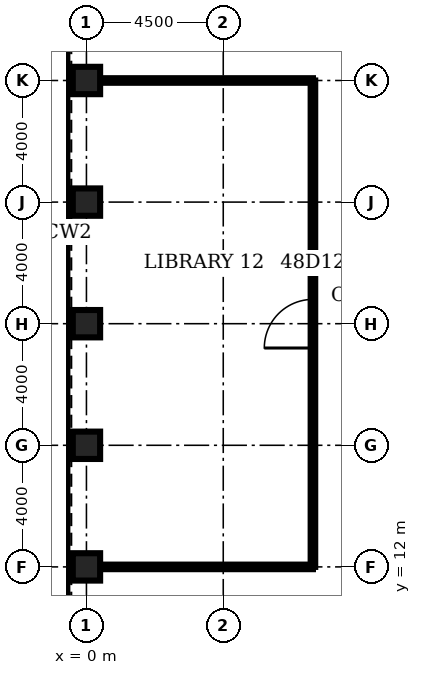
"""IFC4 building model, lengths in metres.
Left out: names, types, materials, properties, quantities, classifications, styles, units other than length and angle.
Written with IfcOpenShell. Run it as: python <this file> out.ifc"""

import sys

from ifc_helpers import new_model, si_unit, direction, frame, frame_2d, origin, origin_2d, place, context, subcontext, project, spatial, rectangle, hollow_rectangle, extrude, element, fill, save


model = new_model("IFC4")
c1 = context("Model", 3, precision=1e-05, world=origin(), true_north=direction((0.0, 1.0)))
c2 = subcontext(c1, "Body", "Model", "MODEL_VIEW")
j1 = project(units=[si_unit("LENGTHUNIT", "METRE"), si_unit("PLANEANGLEUNIT", "RADIAN")], contexts=[c1])
p1 = place(None, origin())
s1 = spatial("IfcSite", under=j1, at=p1, CompositionType="ELEMENT")
p2 = place(p1, origin())
s2 = spatial("IfcBuilding", under=s1, at=p2, CompositionType="ELEMENT")
p3 = place(p2, frame((0.0, 0.0, 215.2)))
s3 = spatial("IfcBuildingStorey", under=s2, at=p3, CompositionType="ELEMENT", Elevation=215.2)
for number, where, z_axis, x_axis in (
    (1, (0.0, 28.0, 0.0), (0.0, 0.0, 1.0), (1.0, 0.0, 0.0)),
    (2, (0.0, 24.0, 0.0), (0.0, 0.0, 1.0), (1.0, 0.0, 0.0)),
    (3, (0.0, 20.0, 0.0), (0.0, 0.0, 1.0), (1.0, 0.0, 0.0)),
    (4, (0.0, 16.0, 0.0), (0.0, 0.0, 1.0), (1.0, 0.0, 0.0)),
    (5, (0.0, 12.0, 0.0), (0.0, 0.0, 1.0), (1.0, 0.0, 0.0)),
):
    element("IfcColumn", number, at=place(p3, frame(where, z_axis=z_axis, x_axis=x_axis)), inside=s3, PredefinedType="COLUMN", context=c2, shape_type="SweptSolid", body=[
        extrude(hollow_rectangle(XDim=0.9, YDim=0.9, WallThickness=0.08, at=origin_2d()), origin(), (0.0, 0.0, 1.0), 4.2),
    ])
for number, where, z_axis, x_axis in (
    (6, (0.45, 12.0, 0.0), (0.0, 0.0, 1.0), (1.0, 0.0, 0.0)),
    (7, (0.45, 28.0, 0.0), (0.0, 0.0, 1.0), (1.0, 0.0, 0.0)),
):
    element("IfcWall", number, at=place(p3, frame(where, z_axis=z_axis, x_axis=x_axis)), inside=s3, PredefinedType="PARTITIONING", context=c2, shape_type="SweptSolid", body=[
        extrude(rectangle(XDim=7.0, YDim=0.15, at=frame_2d((3.5, 0.0))), origin(), (0.0, 0.0, 1.0), 3.0),
    ])
p4 = place(p3, frame((7.45, 12.0, 0.0), z_axis=(0.0, 0.0, 1.0), x_axis=(0.0, 1.0, 0.0)))
e8 = element("IfcWall", 8, at=p4, inside=s3, PredefinedType="PARTITIONING", context=c2, shape_type="SweptSolid", body=[
    extrude(rectangle(XDim=16.0, YDim=0.15, at=frame_2d((8.0, 0.0))), origin(), (0.0, 0.0, 1.0), 3.0),
])
p5 = place(p4, frame((7.2, 0.0, 0.0)))
e9 = element("IfcOpeningElement", 9, at=p5, cuts=e8, PredefinedType="OPENING", context=c2, shape_type="SweptSolid", body=[
    extrude(rectangle(XDim=1.6, YDim=2.1, at=frame_2d((0.8, 1.05))), frame((0.0, 0.085, 0.0), z_axis=(0.0, -1.0, 0.0), x_axis=(1.0, 0.0, 0.0)), (0.0, 0.0, 1.0), 0.17),
])
p6 = place(p5, origin())
e10 = element("IfcDoor", 10, at=p6, inside=s3, OperationType="SINGLE_SWING_LEFT", PredefinedType="DOOR", context=c2, shape_type="SweptSolid", body=[
    extrude(rectangle(XDim=1.6, YDim=2.1, at=frame_2d((0.8, 1.05))), frame((0.0, 0.025, 0.0), z_axis=(0.0, -1.0, 0.0), x_axis=(1.0, 0.0, 0.0)), (0.0, 0.0, 1.0), 0.05),
])
fill(e9, e10)
save(model, sys.argv[1])
